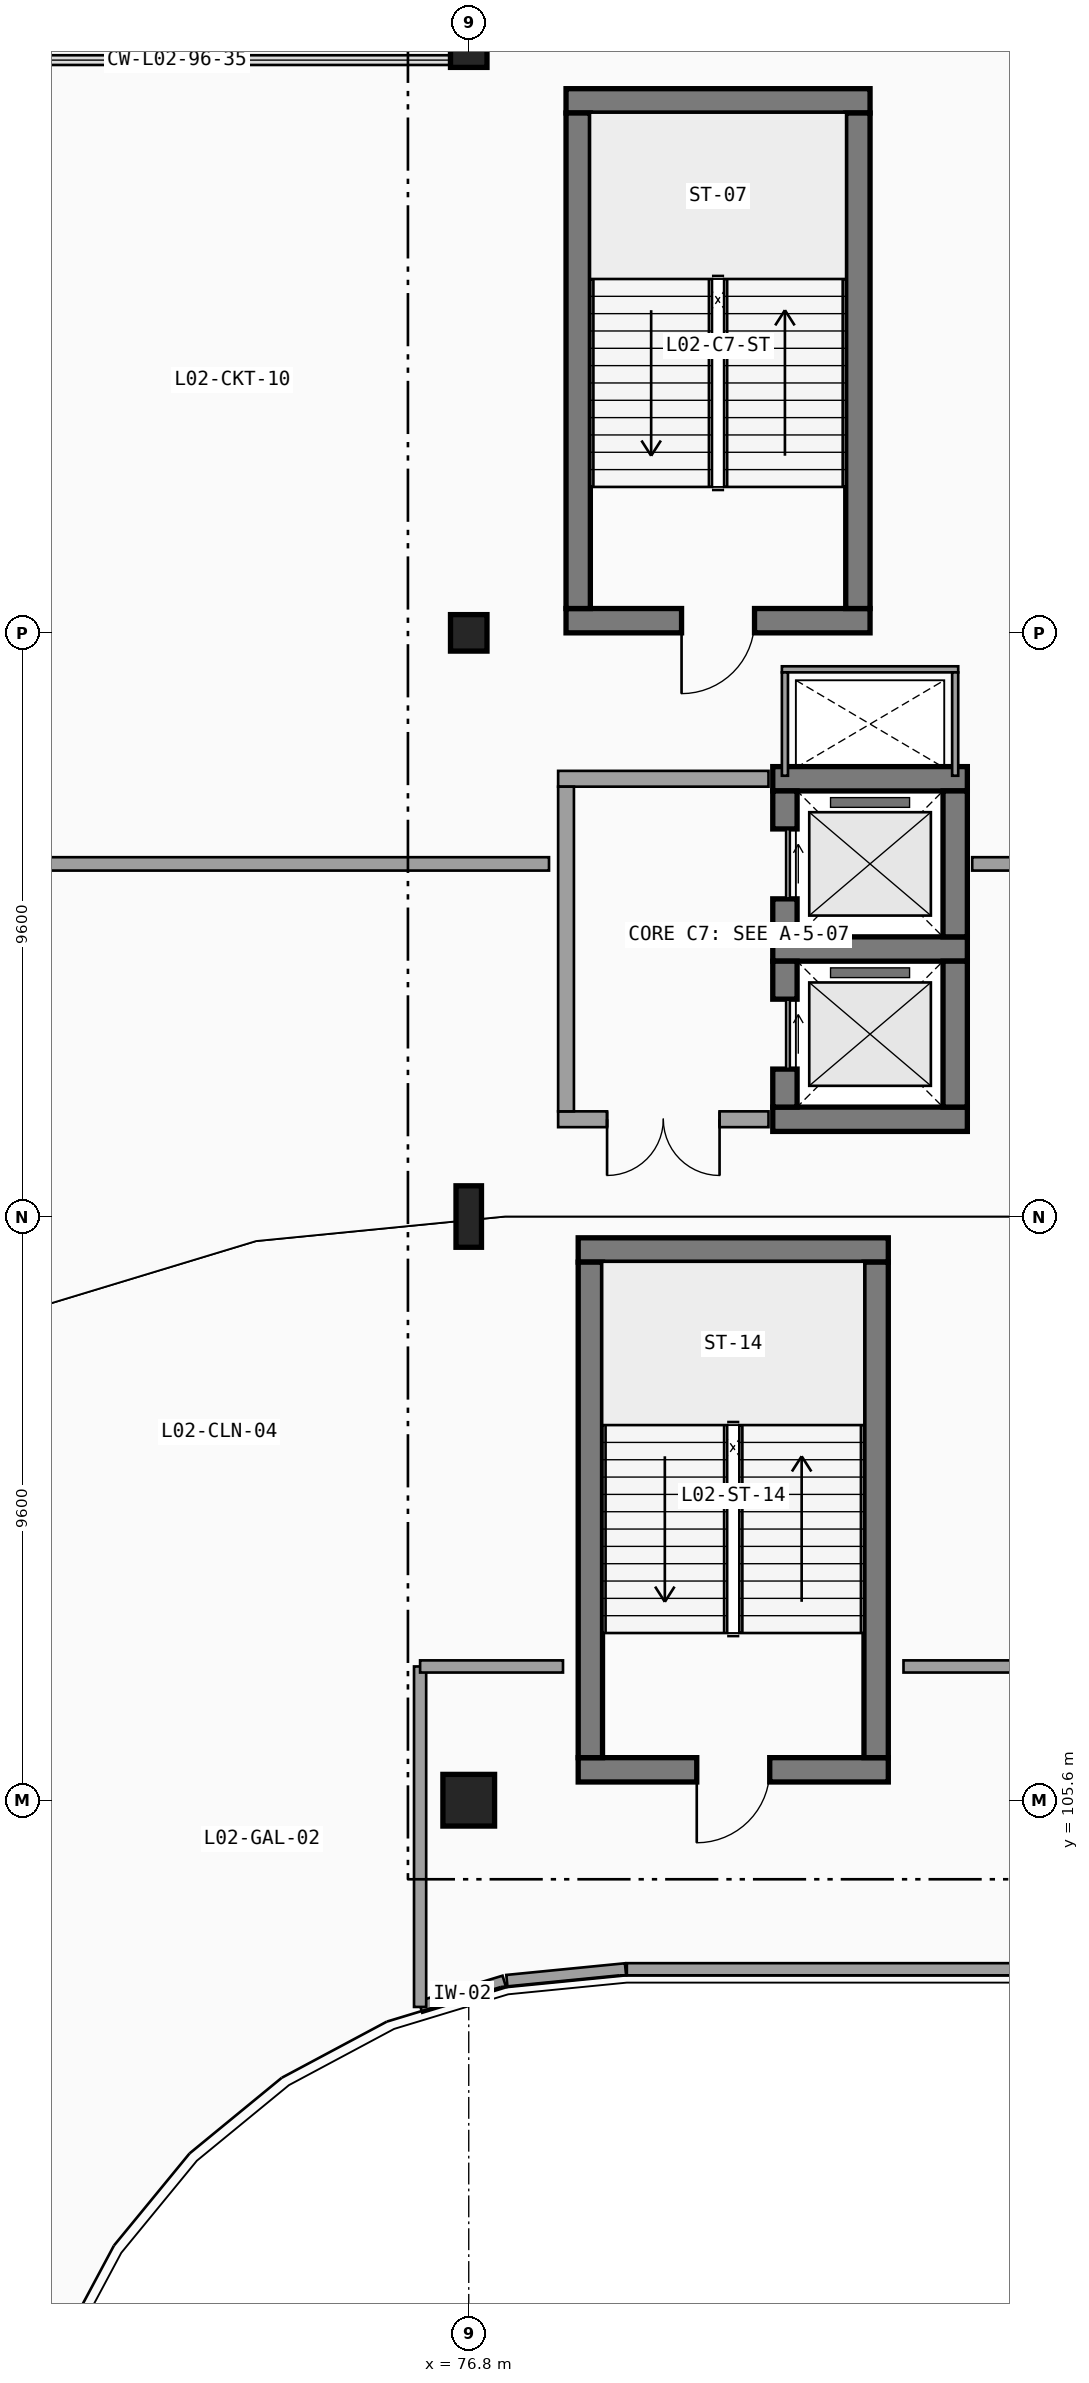
"""IFC4 building model, lengths in metres.
Left out: names, types, materials, properties, quantities, classifications, styles, units other than length and angle.
Written with IfcOpenShell. Run it as: python <this file> out.ifc"""

import sys

from ifc_helpers import new_model, si_unit, direction, frame, frame_2d, origin, origin_2d, place, context, subcontext, project, spatial, rectangle, i_section, extrude, element, fill, save


model = new_model("IFC4")
c1 = context("Model", 3, precision=1e-05, world=origin(), true_north=direction((0.0, 1.0)))
c2 = subcontext(c1, "Body", "Model", "MODEL_VIEW")
j1 = project(units=[si_unit("LENGTHUNIT", "METRE"), si_unit("PLANEANGLEUNIT", "RADIAN")], contexts=[c1])
p1 = place(None, origin())
s1 = spatial("IfcSite", under=j1, at=p1, CompositionType="ELEMENT")
p2 = place(p1, origin())
s2 = spatial("IfcBuilding", under=s1, at=p2, CompositionType="ELEMENT")
p3 = place(p2, frame((0.0, 0.0, 9.6)))
s3 = spatial("IfcBuildingStorey", under=s2, at=p3, CompositionType="ELEMENT", Elevation=9.6)
p4 = place(p3, frame((76.8, 105.6, 0.0), z_axis=(0.0, 0.0, 1.0), x_axis=(1.0, 0.0, 0.0)))
e1 = element("IfcColumn", 1, at=p4, inside=s3, PredefinedType="COLUMN", context=c2, shape_type="SweptSolid", body=[
    extrude(rectangle(XDim=0.85, YDim=0.85, at=origin_2d()), origin(), (0.0, 0.0, 1.0), 4.5),
])
p5 = place(p3, frame((76.8, 115.2, 0.0), z_axis=(0.0, 0.0, 1.0), x_axis=(1.0, 0.0, 0.0)))
e2 = element("IfcColumn", 2, at=p5, inside=s3, PredefinedType="COLUMN", context=c2, shape_type="SweptSolid", body=[
    extrude(i_section(OverallWidth=0.419, OverallDepth=1.011, WebThickness=0.024, FlangeThickness=0.042, FilletRadius=0.031, at=origin_2d()), origin(), (0.0, 0.0, 1.0), 4.5),
])
for number, where, z_axis, x_axis in (
    (3, (76.8, 124.8, 0.0), (0.0, 0.0, 1.0), (1.0, 0.0, 0.0)),
    (4, (76.8, 134.4, 0.0), (0.0, 0.0, 1.0), (1.0, 0.0, 0.0)),
):
    element("IfcColumn", number, at=place(p3, frame(where, z_axis=z_axis, x_axis=x_axis)), inside=s3, PredefinedType="COLUMN", context=c2, shape_type="SweptSolid", body=[
        extrude(rectangle(XDim=0.6, YDim=0.6, at=origin_2d()), origin(), (0.0, 0.0, 1.0), 4.5),
    ])
p6 = place(p3, frame((78.4, 125.0, 0.0), z_axis=(0.0, 0.0, 1.0), x_axis=(1.0, 0.0, 0.0)))
e5 = element("IfcWall", 5, at=p6, inside=s3, PredefinedType="SHEAR", context=c2, shape_type="SweptSolid", body=[
    extrude(rectangle(XDim=5.0, YDim=0.4, at=frame_2d((2.5, 0.0))), origin(), (0.0, 0.0, 1.0), 4.22),
])
p7 = place(p6, frame((3.1, 0.0, 0.0), z_axis=(0.0, 0.0, 1.0), x_axis=(-1.0, 0.0, 0.0)))
e6 = element("IfcOpeningElement", 6, at=p7, cuts=e5, PredefinedType="OPENING", context=c2, shape_type="SweptSolid", body=[
    extrude(rectangle(XDim=1.2, YDim=2.2, at=frame_2d((0.6, 1.1))), frame((0.0, 0.21, 0.0), z_axis=(0.0, -1.0, 0.0), x_axis=(1.0, 0.0, 0.0)), (0.0, 0.0, 1.0), 0.42),
])
p8 = place(p3, frame((83.4, 133.55, 0.0), z_axis=(0.0, 0.0, 1.0), x_axis=(-1.0, 0.0, 0.0)))
e7 = element("IfcWall", 7, at=p8, inside=s3, PredefinedType="SHEAR", context=c2, shape_type="SweptSolid", body=[
    extrude(rectangle(XDim=5.0, YDim=0.4, at=frame_2d((2.5, 0.0))), origin(), (0.0, 0.0, 1.0), 4.22),
])
for number, where, z_axis, x_axis in (
    (8, (78.6, 133.35, 0.0), (0.0, 0.0, 1.0), (0.0, -1.0, 0.0)),
    (9, (83.2, 125.2, 0.0), (0.0, 0.0, 1.0), (0.0, 1.0, 0.0)),
):
    element("IfcWall", number, at=place(p3, frame(where, z_axis=z_axis, x_axis=x_axis)), inside=s3, PredefinedType="SHEAR", context=c2, shape_type="SweptSolid", body=[
        extrude(rectangle(XDim=8.15, YDim=0.4, at=frame_2d((4.075, 0.0))), origin(), (0.0, 0.0, 1.0), 4.22),
    ])
for number, where, z_axis, x_axis in (
    (10, (81.8, 116.8, 0.0), (0.0, 0.0, 1.0), (1.0, 0.0, 0.0)),
    (11, (85.0, 119.6, 0.0), (0.0, 0.0, 1.0), (-1.0, 0.0, 0.0)),
):
    element("IfcWall", number, at=place(p3, frame(where, z_axis=z_axis, x_axis=x_axis)), inside=s3, PredefinedType="SHEAR", context=c2, shape_type="SweptSolid", body=[
        extrude(rectangle(XDim=3.2, YDim=0.4, at=frame_2d((1.6, 0.0))), origin(), (0.0, 0.0, 1.0), 4.22),
    ])
p9 = place(p3, frame((82.0, 119.4, 0.0), z_axis=(0.0, 0.0, 1.0), x_axis=(0.0, -1.0, 0.0)))
e12 = element("IfcWall", 12, at=p9, inside=s3, PredefinedType="SHEAR", context=c2, shape_type="SweptSolid", body=[
    extrude(rectangle(XDim=2.4, YDim=0.4, at=frame_2d((1.2, 0.0))), origin(), (0.0, 0.0, 1.0), 4.22),
])
p10 = place(p9, frame((0.625, 0.0, 0.0), z_axis=(0.0, 0.0, 1.0), x_axis=(1.0, 0.0, 0.0)))
e13 = element("IfcOpeningElement", 13, at=p10, cuts=e12, PredefinedType="OPENING", context=c2, shape_type="SweptSolid", body=[
    extrude(rectangle(XDim=1.15, YDim=2.2, at=frame_2d((0.575, 1.1))), frame((0.0, 0.21, 0.0), z_axis=(0.0, -1.0, 0.0), x_axis=(1.0, 0.0, 0.0)), (0.0, 0.0, 1.0), 0.42),
])
p11 = place(p3, frame((84.8, 117.0, 0.0), z_axis=(0.0, 0.0, 1.0), x_axis=(0.0, 1.0, 0.0)))
e14 = element("IfcWall", 14, at=p11, inside=s3, PredefinedType="SHEAR", context=c2, shape_type="SweptSolid", body=[
    extrude(rectangle(XDim=2.4, YDim=0.4, at=frame_2d((1.2, 0.0))), origin(), (0.0, 0.0, 1.0), 4.22),
])
p12 = place(p3, frame((85.0, 122.4, 0.0), z_axis=(0.0, 0.0, 1.0), x_axis=(-1.0, 0.0, 0.0)))
e15 = element("IfcWall", 15, at=p12, inside=s3, PredefinedType="SHEAR", context=c2, shape_type="SweptSolid", body=[
    extrude(rectangle(XDim=3.2, YDim=0.4, at=frame_2d((1.6, 0.0))), origin(), (0.0, 0.0, 1.0), 4.22),
])
p13 = place(p3, frame((82.0, 122.2, 0.0), z_axis=(0.0, 0.0, 1.0), x_axis=(0.0, -1.0, 0.0)))
e16 = element("IfcWall", 16, at=p13, inside=s3, PredefinedType="SHEAR", context=c2, shape_type="SweptSolid", body=[
    extrude(rectangle(XDim=2.4, YDim=0.4, at=frame_2d((1.2, 0.0))), origin(), (0.0, 0.0, 1.0), 4.22),
])
p14 = place(p13, frame((0.625, 0.0, 0.0), z_axis=(0.0, 0.0, 1.0), x_axis=(1.0, 0.0, 0.0)))
e17 = element("IfcOpeningElement", 17, at=p14, cuts=e16, PredefinedType="OPENING", context=c2, shape_type="SweptSolid", body=[
    extrude(rectangle(XDim=1.15, YDim=2.2, at=frame_2d((0.575, 1.1))), frame((0.0, 0.21, 0.0), z_axis=(0.0, -1.0, 0.0), x_axis=(1.0, 0.0, 0.0)), (0.0, 0.0, 1.0), 0.42),
])
p15 = place(p3, frame((84.8, 119.8, 0.0), z_axis=(0.0, 0.0, 1.0), x_axis=(0.0, 1.0, 0.0)))
e18 = element("IfcWall", 18, at=p15, inside=s3, PredefinedType="SHEAR", context=c2, shape_type="SweptSolid", body=[
    extrude(rectangle(XDim=2.4, YDim=0.4, at=frame_2d((1.2, 0.0))), origin(), (0.0, 0.0, 1.0), 4.22),
])
p16 = place(p3, frame((84.85, 124.2, 0.0), z_axis=(0.0, 0.0, 1.0), x_axis=(-1.0, 0.0, 0.0)))
e19 = element("IfcWall", 19, at=p16, inside=s3, PredefinedType="PARTITIONING", context=c2, shape_type="SweptSolid", body=[
    extrude(rectangle(XDim=2.9, YDim=0.1, at=frame_2d((1.45, 0.0))), origin(), (0.0, 0.0, 1.0), 4.22),
])
for number, where, z_axis, x_axis in (
    (20, (82.0, 124.15, 0.0), (0.0, 0.0, 1.0), (0.0, -1.0, 0.0)),
    (21, (84.8, 122.45, 0.0), (0.0, 0.0, 1.0), (0.0, 1.0, 0.0)),
):
    element("IfcWall", number, at=place(p3, frame(where, z_axis=z_axis, x_axis=x_axis)), inside=s3, PredefinedType="PARTITIONING", context=c2, shape_type="SweptSolid", body=[
        extrude(rectangle(XDim=1.7, YDim=0.1, at=frame_2d((0.85, 0.0))), origin(), (0.0, 0.0, 1.0), 4.22),
    ])
p17 = place(p3, frame((78.27, 116.8, 0.0), z_axis=(0.0, 0.0, 1.0), x_axis=(1.0, 0.0, 0.0)))
e22 = element("IfcWall", 22, at=p17, inside=s3, PredefinedType="SOLIDWALL", context=c2, shape_type="SweptSolid", body=[
    extrude(rectangle(XDim=3.46, YDim=0.26, at=frame_2d((1.73, 0.0))), origin(), (0.0, 0.0, 1.0), 4.22),
])
p18 = place(p17, frame((2.655, 0.0, 0.0), z_axis=(0.0, 0.0, 1.0), x_axis=(-1.0, 0.0, 0.0)))
e23 = element("IfcOpeningElement", 23, at=p18, cuts=e22, PredefinedType="OPENING", context=c2, shape_type="SweptSolid", body=[
    extrude(rectangle(XDim=1.85, YDim=2.25, at=frame_2d((0.925, 1.125))), frame((0.0, 0.14, 0.0), z_axis=(0.0, -1.0, 0.0), x_axis=(1.0, 0.0, 0.0)), (0.0, 0.0, 1.0), 0.28),
])
p19 = place(p3, frame((81.73, 122.4, 0.0), z_axis=(0.0, 0.0, 1.0), x_axis=(-1.0, 0.0, 0.0)))
e24 = element("IfcWall", 24, at=p19, inside=s3, PredefinedType="SOLIDWALL", context=c2, shape_type="SweptSolid", body=[
    extrude(rectangle(XDim=3.46, YDim=0.26, at=frame_2d((1.73, 0.0))), origin(), (0.0, 0.0, 1.0), 4.22),
])
p20 = place(p3, frame((78.4, 122.27, 0.0), z_axis=(0.0, 0.0, 1.0), x_axis=(0.0, -1.0, 0.0)))
e25 = element("IfcWall", 25, at=p20, inside=s3, PredefinedType="SOLIDWALL", context=c2, shape_type="SweptSolid", body=[
    extrude(rectangle(XDim=5.34, YDim=0.26, at=frame_2d((2.67, 0.0))), origin(), (0.0, 0.0, 1.0), 4.22),
])
p21 = place(p3, frame((78.6, 106.1, 0.0), z_axis=(0.0, 0.0, 1.0), x_axis=(1.0, 0.0, 0.0)))
e26 = element("IfcWall", 26, at=p21, inside=s3, PredefinedType="SHEAR", context=c2, shape_type="SweptSolid", body=[
    extrude(rectangle(XDim=5.1, YDim=0.4, at=frame_2d((2.55, 0.0))), origin(), (0.0, 0.0, 1.0), 4.22),
])
p22 = place(p21, frame((3.15, 0.0, 0.0), z_axis=(0.0, 0.0, 1.0), x_axis=(-1.0, 0.0, 0.0)))
e27 = element("IfcOpeningElement", 27, at=p22, cuts=e26, PredefinedType="OPENING", context=c2, shape_type="SweptSolid", body=[
    extrude(rectangle(XDim=1.2, YDim=2.2, at=frame_2d((0.6, 1.1))), frame((0.0, 0.21, 0.0), z_axis=(0.0, -1.0, 0.0), x_axis=(1.0, 0.0, 0.0)), (0.0, 0.0, 1.0), 0.42),
])
p23 = place(p3, frame((83.7, 114.65, 0.0), z_axis=(0.0, 0.0, 1.0), x_axis=(-1.0, 0.0, 0.0)))
e28 = element("IfcWall", 28, at=p23, inside=s3, PredefinedType="SHEAR", context=c2, shape_type="SweptSolid", body=[
    extrude(rectangle(XDim=5.1, YDim=0.4, at=frame_2d((2.55, 0.0))), origin(), (0.0, 0.0, 1.0), 4.22),
])
for number, where, z_axis, x_axis in (
    (29, (78.8, 114.45, 0.0), (0.0, 0.0, 1.0), (0.0, -1.0, 0.0)),
    (30, (83.5, 106.3, 0.0), (0.0, 0.0, 1.0), (0.0, 1.0, 0.0)),
):
    element("IfcWall", number, at=place(p3, frame(where, z_axis=z_axis, x_axis=x_axis)), inside=s3, PredefinedType="SHEAR", context=c2, shape_type="SweptSolid", body=[
        extrude(rectangle(XDim=8.15, YDim=0.4, at=frame_2d((4.075, 0.0))), origin(), (0.0, 0.0, 1.0), 4.22),
    ])
p24 = place(p3, frame((77.385, 102.618, 0.0), z_axis=(0.0, 0.0, 1.0), x_axis=(-0.956921766266, -0.290345885534, 0.0)))
e31 = element("IfcWall", 31, at=p24, inside=s3, PredefinedType="PARTITIONING", context=c2, shape_type="SweptSolid", body=[
    extrude(rectangle(XDim=1.441, YDim=0.2, at=frame_2d((0.721, 0.0))), origin(), (0.0, 0.0, 1.0), 4.22),
])
p25 = place(p3, frame((76.0, 102.2, 0.0), z_axis=(0.0, 0.0, 1.0), x_axis=(0.0, 1.0, 0.0)))
e32 = element("IfcWall", 32, at=p25, inside=s3, PredefinedType="PARTITIONING", context=c2, shape_type="SweptSolid", body=[
    extrude(rectangle(XDim=5.6, YDim=0.2, at=frame_2d((2.8, 0.0))), origin(), (0.0, 0.0, 1.0), 3.466),
])
p26 = place(p3, frame((76.0, 107.8, 0.0), z_axis=(0.0, 0.0, 1.0), x_axis=(1.0, 0.0, 0.0)))
e33 = element("IfcWall", 33, at=p26, inside=s3, PredefinedType="PARTITIONING", context=c2, shape_type="SweptSolid", body=[
    extrude(rectangle(XDim=2.35, YDim=0.2, at=frame_2d((1.175, 0.0))), origin(), (0.0, 0.0, 1.0), 3.613),
])
p27 = place(p3, frame((83.95, 107.8, 0.0), z_axis=(0.0, 0.0, 1.0), x_axis=(1.0, 0.0, 0.0)))
e34 = element("IfcWall", 34, at=p27, inside=s3, PredefinedType="PARTITIONING", context=c2, shape_type="SweptSolid", body=[
    extrude(rectangle(XDim=3.67, YDim=0.2, at=frame_2d((1.835, 0.0))), origin(), (0.0, 0.0, 1.0), 3.613),
])
p28 = place(p3, frame((141.4, 102.82, 0.0), z_axis=(0.0, 0.0, 1.0), x_axis=(-1.0, 0.0, 0.0)))
e35 = element("IfcWall", 35, at=p28, inside=s3, PredefinedType="PARTITIONING", context=c2, shape_type="SweptSolid", body=[
    extrude(rectangle(XDim=62.0, YDim=0.2, at=frame_2d((31.0, 0.0))), origin(), (0.0, 0.0, 1.0), 4.22),
])
p29 = place(p3, frame((79.378, 102.819, 0.0), z_axis=(0.0, 0.0, 1.0), x_axis=(-0.995185270943, -0.098011614095, 0.0)))
e36 = element("IfcWall", 36, at=p29, inside=s3, PredefinedType="PARTITIONING", context=c2, shape_type="SweptSolid", body=[
    extrude(rectangle(XDim=1.96, YDim=0.2, at=frame_2d((0.98, 0.0))), origin(), (0.0, 0.0, 1.0), 4.22),
])
p30 = place(p3, frame((91.4, 121.0, 0.0), z_axis=(0.0, 0.0, 1.0), x_axis=(-1.0, 0.0, 0.0)))
e37 = element("IfcWall", 37, at=p30, inside=s3, PredefinedType="PARTITIONING", context=c2, shape_type="SweptSolid", body=[
    extrude(rectangle(XDim=6.32, YDim=0.22, at=frame_2d((3.16, 0.0))), origin(), (0.0, 0.0, 1.0), 3.613),
])
p31 = place(p3, frame((78.12, 121.0, 0.0), z_axis=(0.0, 0.0, 1.0), x_axis=(-1.0, 0.0, 0.0)))
e38 = element("IfcWall", 38, at=p31, inside=s3, PredefinedType="PARTITIONING", context=c2, shape_type="SweptSolid", body=[
    extrude(rectangle(XDim=10.52, YDim=0.22, at=frame_2d((5.26, 0.0))), origin(), (0.0, 0.0, 1.0), 3.613),
])
p32 = place(p7, origin())
e39 = element("IfcDoor", 39, at=p32, inside=s3, OperationType="SINGLE_SWING_RIGHT", PredefinedType="DOOR", context=c2, shape_type="SweptSolid", body=[
    extrude(rectangle(XDim=1.2, YDim=2.2, at=frame_2d((0.6, 1.1))), frame((0.0, 0.025, 0.0), z_axis=(0.0, -1.0, 0.0), x_axis=(1.0, 0.0, 0.0)), (0.0, 0.0, 1.0), 0.05),
])
fill(e6, e39)
p33 = place(p10, origin())
e40 = element("IfcDoor", 40, at=p33, inside=s3, OperationType="SLIDING_TO_LEFT", PredefinedType="DOOR", context=c2, shape_type="SweptSolid", body=[
    extrude(rectangle(XDim=1.15, YDim=2.2, at=frame_2d((0.575, 1.1))), frame((0.0, 0.025, 0.0), z_axis=(0.0, -1.0, 0.0), x_axis=(1.0, 0.0, 0.0)), (0.0, 0.0, 1.0), 0.05),
])
fill(e13, e40)
p34 = place(p14, origin())
e41 = element("IfcDoor", 41, at=p34, inside=s3, OperationType="SLIDING_TO_LEFT", PredefinedType="DOOR", context=c2, shape_type="SweptSolid", body=[
    extrude(rectangle(XDim=1.15, YDim=2.2, at=frame_2d((0.575, 1.1))), frame((0.0, 0.025, 0.0), z_axis=(0.0, -1.0, 0.0), x_axis=(1.0, 0.0, 0.0)), (0.0, 0.0, 1.0), 0.05),
])
fill(e17, e41)
p35 = place(p18, origin())
e42 = element("IfcDoor", 42, at=p35, inside=s3, OperationType="DOUBLE_DOOR_SINGLE_SWING", PredefinedType="DOOR", context=c2, shape_type="SweptSolid", body=[
    extrude(rectangle(XDim=1.85, YDim=2.25, at=frame_2d((0.925, 1.125))), frame((0.0, 0.025, 0.0), z_axis=(0.0, -1.0, 0.0), x_axis=(1.0, 0.0, 0.0)), (0.0, 0.0, 1.0), 0.05),
])
fill(e23, e42)
p36 = place(p22, origin())
e43 = element("IfcDoor", 43, at=p36, inside=s3, OperationType="SINGLE_SWING_RIGHT", PredefinedType="DOOR", context=c2, shape_type="SweptSolid", body=[
    extrude(rectangle(XDim=1.2, YDim=2.2, at=frame_2d((0.6, 1.1))), frame((0.0, 0.025, 0.0), z_axis=(0.0, -1.0, 0.0), x_axis=(1.0, 0.0, 0.0)), (0.0, 0.0, 1.0), 0.05),
])
fill(e27, e43)
save(model, sys.argv[1])
